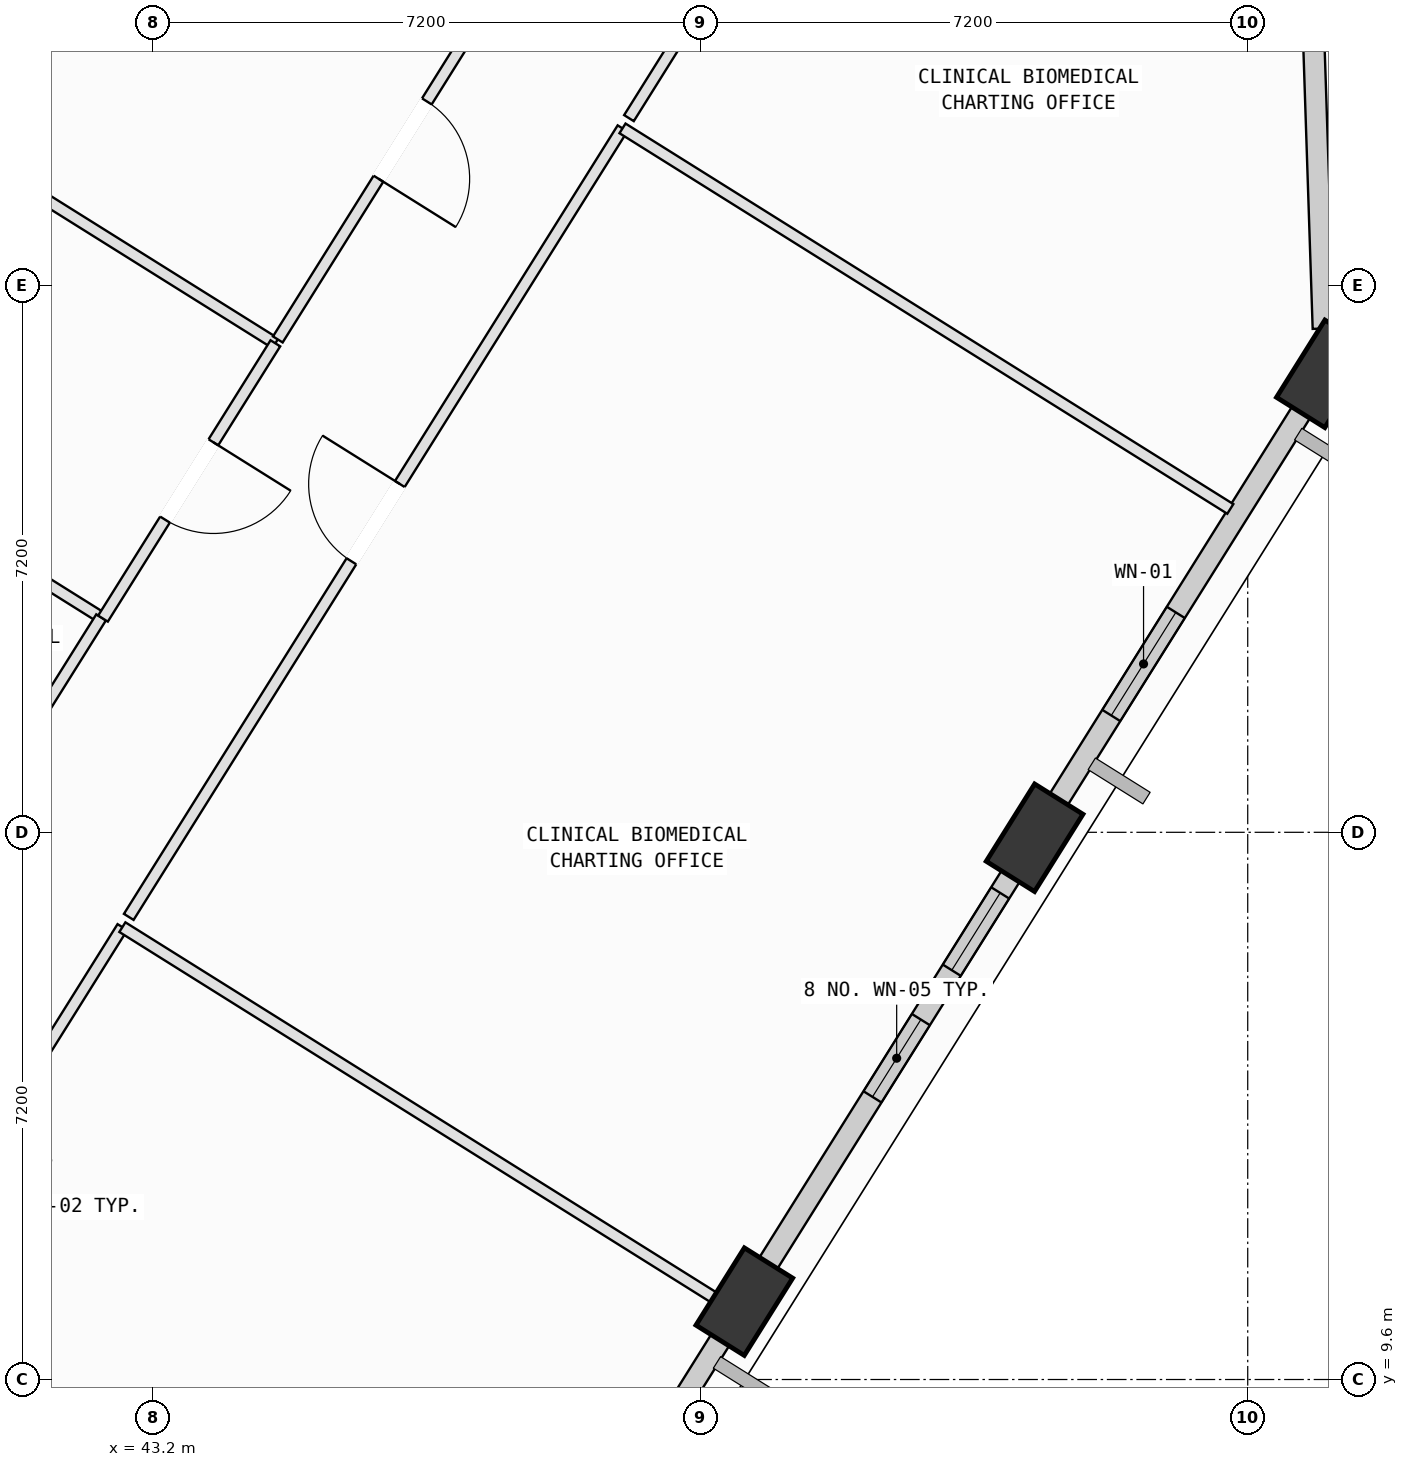
"""IFC4 building model, lengths in metres.
Left out: names, types, materials, properties, quantities, classifications, styles, units other than length and angle.
Written with IfcOpenShell. Run it as: python <this file> out.ifc"""

import sys

from ifc_helpers import new_model, si_unit, direction, frame, frame_2d, origin, origin_2d, place, context, subcontext, project, spatial, rectangle, extrude, element, fill, save


model = new_model("IFC4")
c1 = context("Model", 3, precision=1e-05, world=origin(), true_north=direction((0.0, 1.0)))
c2 = subcontext(c1, "Body", "Model", "MODEL_VIEW")
j1 = project(units=[si_unit("LENGTHUNIT", "METRE"), si_unit("PLANEANGLEUNIT", "RADIAN")], contexts=[c1])
p1 = place(None, origin())
s1 = spatial("IfcSite", under=j1, at=p1, CompositionType="ELEMENT")
p2 = place(p1, origin())
s2 = spatial("IfcBuilding", under=s1, at=p2, CompositionType="ELEMENT")
p3 = place(p2, frame((0.0, 0.0, 272.6)))
s3 = spatial("IfcBuildingStorey", under=s2, at=p3, CompositionType="ELEMENT", Elevation=272.6)
p4 = place(p3, frame((50.977, 10.625, 0.068), z_axis=(0.05795606308, 0.072182204498, 0.995706193667), x_axis=(-0.942163536267, -0.325840094684, 0.078460841345)))
e1 = element("IfcColumn", 1, at=p4, inside=s3, PredefinedType="COLUMN", context=c2, shape_type="SweptSolid", body=[
    extrude(rectangle(XDim=1.2, YDim=0.75, at=origin_2d()), origin(), (0.0, 0.0, 1.0), 3.947),
])
p5 = place(p3, frame((54.796, 16.728, 0.069), z_axis=(0.032599412049, 0.087715306046, 0.995612024545), x_axis=(-0.791394163141, -0.606138977374, 0.079314681199)))
e2 = element("IfcColumn", 2, at=p5, inside=s3, PredefinedType="COLUMN", context=c2, shape_type="SweptSolid", body=[
    extrude(rectangle(XDim=1.2, YDim=0.75, at=origin_2d()), origin(), (0.0, 0.0, 1.0), 3.947),
])
p6 = place(p3, frame((58.615, 22.833, 0.076), z_axis=(0.007305287908, 0.103202669001, 0.994633521394), x_axis=(-0.588860753256, -0.803463214161, 0.087691942418)))
e3 = element("IfcColumn", 3, at=p6, inside=s3, PredefinedType="COLUMN", context=c2, shape_type="SweptSolid", body=[
    extrude(rectangle(XDim=1.2, YDim=0.75, at=origin_2d()), origin(), (0.0, 0.0, 1.0), 3.944),
])
p7 = place(p3, frame((50.86, 10.44, 0.0), z_axis=(0.0, 0.0, 1.0), x_axis=(-0.530676257758, -0.847574604063, 0.0)))
e4 = element("IfcWall", 4, at=p7, inside=s3, PredefinedType="SOLIDWALL", context=c2, shape_type="SweptSolid", body=[
    extrude(rectangle(XDim=6.414, YDim=0.28, at=frame_2d((3.207, 0.0))), origin(), (0.0, 0.0, 1.0), 3.265),
])
p8 = place(p7, frame((2.305, 0.0, 0.75)))
e5 = element("IfcOpeningElement", 5, at=p8, cuts=e4, PredefinedType="OPENING", context=c2, shape_type="SweptSolid", body=[
    extrude(rectangle(XDim=1.8, YDim=2.05, at=frame_2d((0.9, 1.025))), frame((0.0, 0.15, 0.0), z_axis=(0.0, -1.0, 0.0), x_axis=(1.0, 0.0, 0.0)), (0.0, 0.0, 1.0), 0.3),
])
p9 = place(p3, frame((54.681, 16.543, 0.0), z_axis=(0.0, 0.0, 1.0), x_axis=(-0.530659848468, -0.847584877888, 0.0)))
e6 = element("IfcWall", 6, at=p9, inside=s3, PredefinedType="SOLIDWALL", context=c2, shape_type="SweptSolid", body=[
    extrude(rectangle(XDim=6.407, YDim=0.28, at=frame_2d((3.204, 0.0))), origin(), (0.0, 0.0, 1.0), 3.265),
])
p10 = place(p9, frame((2.604, 0.0, 0.75)))
e7 = element("IfcOpeningElement", 7, at=p10, cuts=e6, PredefinedType="OPENING", context=c2, shape_type="SweptSolid", body=[
    extrude(rectangle(XDim=1.2, YDim=1.75, at=frame_2d((0.6, 0.875))), frame((0.0, 0.15, 0.0), z_axis=(0.0, -1.0, 0.0), x_axis=(1.0, 0.0, 0.0)), (0.0, 0.0, 1.0), 0.3),
])
p11 = place(p9, frame((0.637, 0.0, 0.75)))
e8 = element("IfcOpeningElement", 8, at=p11, cuts=e6, PredefinedType="OPENING", context=c2, shape_type="SweptSolid", body=[
    extrude(rectangle(XDim=1.2, YDim=1.75, at=frame_2d((0.6, 0.875))), frame((0.0, 0.15, 0.0), z_axis=(0.0, -1.0, 0.0), x_axis=(1.0, 0.0, 0.0)), (0.0, 0.0, 1.0), 0.3),
])
p12 = place(p3, frame((58.507, 22.654, 0.0), z_axis=(0.0, 0.0, 1.0), x_axis=(-0.530658662943, -0.847585620125, 0.0)))
e9 = element("IfcWall", 9, at=p12, inside=s3, PredefinedType="SOLIDWALL", context=c2, shape_type="SweptSolid", body=[
    extrude(rectangle(XDim=6.418, YDim=0.28, at=frame_2d((3.209, 0.0))), origin(), (0.0, 0.0, 1.0), 3.265),
])
p13 = place(p12, frame((3.493, 0.0, 0.75)))
e10 = element("IfcOpeningElement", 10, at=p13, cuts=e9, PredefinedType="OPENING", context=c2, shape_type="SweptSolid", body=[
    extrude(rectangle(XDim=1.6, YDim=1.95, at=frame_2d((0.8, 0.975))), frame((0.0, 0.15, 0.0), z_axis=(0.0, -1.0, 0.0), x_axis=(1.0, 0.0, 0.0)), (0.0, 0.0, 1.0), 0.3),
])
p14 = place(p3, frame((58.419, 28.719, 0.0), z_axis=(0.0, 0.0, 1.0), x_axis=(0.033204271965, -0.999448586133, 0.0)))
e11 = element("IfcWall", 11, at=p14, inside=s3, PredefinedType="SOLIDWALL", context=c2, shape_type="SweptSolid", body=[
    extrude(rectangle(XDim=5.294, YDim=0.28, at=frame_2d((2.647, 0.0))), origin(), (0.0, 0.0, 1.0), 3.265),
])
p15 = place(p3, frame((39.48, 10.259, 0.0), z_axis=(0.0, 0.0, 1.0), x_axis=(0.530673487846, 0.84757633833, 0.0)))
e12 = element("IfcWall", 12, at=p15, inside=s3, PredefinedType="PARTITIONING", context=c2, shape_type="SweptSolid", body=[
    extrude(rectangle(XDim=6.245, YDim=0.15, at=frame_2d((3.123, 0.0))), origin(), (0.0, 0.0, 1.0), 3.78),
])
p16 = place(p15, frame((2.522, 0.0, 0.0)))
e13 = element("IfcOpeningElement", 13, at=p16, cuts=e12, PredefinedType="OPENING", context=c2, shape_type="SweptSolid", body=[
    extrude(rectangle(XDim=1.2, YDim=2.15, at=frame_2d((0.6, 1.075))), frame((0.0, 0.085, 0.0), z_axis=(0.0, -1.0, 0.0), x_axis=(1.0, 0.0, 0.0)), (0.0, 0.0, 1.0), 0.17),
])
p17 = place(p3, frame((42.794, 15.552, 0.0), z_axis=(0.0, 0.0, 1.0), x_axis=(0.84754648377, -0.530721167704, 0.0)))
e14 = element("IfcWall", 14, at=p17, inside=s3, PredefinedType="PARTITIONING", context=c2, shape_type="SweptSolid", body=[
    extrude(rectangle(XDim=9.447, YDim=0.15, at=frame_2d((4.724, 0.0))), origin(), (0.0, 0.0, 1.0), 3.78),
])
p18 = place(p3, frame((42.878, 15.687, 0.0), z_axis=(0.0, 0.0, 1.0), x_axis=(0.530687191851, 0.847567758002, 0.0)))
e15 = element("IfcWall", 15, at=p18, inside=s3, PredefinedType="PARTITIONING", context=c2, shape_type="SweptSolid", body=[
    extrude(rectangle(XDim=12.241, YDim=0.15, at=frame_2d((6.121, 0.0))), origin(), (0.0, 0.0, 1.0), 3.415),
])
p19 = place(p18, frame((5.521, 0.0, 0.0)))
e16 = element("IfcOpeningElement", 16, at=p19, cuts=e15, PredefinedType="OPENING", context=c2, shape_type="SweptSolid", body=[
    extrude(rectangle(XDim=1.2, YDim=2.15, at=frame_2d((0.6, 1.075))), frame((0.0, 0.085, 0.0), z_axis=(0.0, -1.0, 0.0), x_axis=(1.0, 0.0, 0.0)), (0.0, 0.0, 1.0), 0.17),
])
p20 = place(p3, frame((49.374, 26.062, 0.0), z_axis=(0.0, 0.0, 1.0), x_axis=(0.847573559708, -0.530677925756, 0.0)))
e17 = element("IfcWall", 17, at=p20, inside=s3, PredefinedType="PARTITIONING", context=c2, shape_type="SweptSolid", body=[
    extrude(rectangle(XDim=9.435, YDim=0.15, at=frame_2d((4.718, 0.0))), origin(), (0.0, 0.0, 1.0), 3.78),
])
p21 = place(p3, frame((55.296, 17.092, 0.0), z_axis=(0.0, 0.0, 1.0), x_axis=(-0.53041467039, -0.847738330757, 0.0)))
e18 = element("IfcWall", 18, at=p21, inside=s3, PredefinedType="PARTITIONING", context=c2, shape_type="SweptSolid", body=[
    extrude(rectangle(XDim=0.792, YDim=0.15, at=frame_2d((0.396, 0.0))), origin(), (0.0, 0.0, 1.0), 3.265),
])
p22 = place(p3, frame((51.476, 10.991, 0.0), z_axis=(0.0, 0.0, 1.0), x_axis=(-0.530036692051, -0.847974707806, 0.0)))
e19 = element("IfcWall", 19, at=p22, inside=s3, PredefinedType="PARTITIONING", context=c2, shape_type="SweptSolid", body=[
    extrude(rectangle(XDim=0.581, YDim=0.15, at=frame_2d((0.291, 0.0))), origin(), (0.0, 0.0, 1.0), 3.265),
])
p23 = place(p3, frame((60.162, 24.864, 0.0), z_axis=(0.0, 0.0, 1.0), x_axis=(-0.530700631331, -0.847559342999, 0.0)))
e20 = element("IfcWall", 20, at=p23, inside=s3, PredefinedType="PARTITIONING", context=c2, shape_type="SweptSolid", body=[
    extrude(rectangle(XDim=2.751, YDim=0.15, at=frame_2d((1.376, 0.0))), origin(), (0.0, 0.0, 1.0), 3.265),
])
p24 = place(p3, frame((49.459, 26.197, 0.0), z_axis=(0.0, 0.0, 1.0), x_axis=(0.530644342524, 0.847594585723, 0.0)))
e21 = element("IfcWall", 21, at=p24, inside=s3, PredefinedType="PARTITIONING", context=c2, shape_type="SweptSolid", body=[
    extrude(rectangle(XDim=6.935, YDim=0.15, at=frame_2d((3.467, 0.0))), origin(), (0.0, 0.0, 1.0), 3.78),
])
p25 = place(p24, frame((2.867, 0.0, 0.0)))
e22 = element("IfcOpeningElement", 22, at=p25, cuts=e21, PredefinedType="OPENING", context=c2, shape_type="SweptSolid", body=[
    extrude(rectangle(XDim=1.2, YDim=2.15, at=frame_2d((0.6, 1.075))), frame((0.0, 0.085, 0.0), z_axis=(0.0, -1.0, 0.0), x_axis=(1.0, 0.0, 0.0)), (0.0, 0.0, 1.0), 0.17),
])
p26 = place(p3, frame((34.462, 24.67, 0.0), z_axis=(0.0, 0.0, 1.0), x_axis=(0.847549004831, -0.53071714162, 0.0)))
e23 = element("IfcWall", 23, at=p26, inside=s3, PredefinedType="PARTITIONING", context=c2, shape_type="SweptSolid", body=[
    extrude(rectangle(XDim=9.5, YDim=0.15, at=frame_2d((4.75, 0.0))), origin(), (0.0, 0.0, 1.0), 3.78),
])
p27 = place(p3, frame((42.514, 19.628, 0.0), z_axis=(0.0, 0.0, 1.0), x_axis=(-0.530655141338, -0.847587824931, 0.0)))
e24 = element("IfcWall", 24, at=p27, inside=s3, PredefinedType="PARTITIONING", context=c2, shape_type="SweptSolid", body=[
    extrude(rectangle(XDim=5.717, YDim=0.15, at=frame_2d((2.859, 0.0))), origin(), (0.0, 0.0, 1.0), 3.78),
])
p28 = place(p3, frame((37.293, 27.938, 0.0), z_axis=(0.0, 0.0, 1.0), x_axis=(0.847597339737, -0.530639943531, 0.0)))
e25 = element("IfcWall", 25, at=p28, inside=s3, PredefinedType="PARTITIONING", context=c2, shape_type="SweptSolid", body=[
    extrude(rectangle(XDim=8.865, YDim=0.15, at=frame_2d((4.433, 0.0))), origin(), (0.0, 0.0, 1.0), 3.78),
])
p29 = place(p3, frame((44.807, 23.234, 0.0), z_axis=(0.0, 0.0, 1.0), x_axis=(-0.530702319906, -0.847558285693, 0.0)))
e26 = element("IfcWall", 26, at=p29, inside=s3, PredefinedType="PARTITIONING", context=c2, shape_type="SweptSolid", body=[
    extrude(rectangle(XDim=4.273, YDim=0.15, at=frame_2d((2.137, 0.0))), origin(), (0.0, 0.0, 1.0), 3.78),
])
p30 = place(p29, frame((1.537, 0.0, 0.0)))
e27 = element("IfcOpeningElement", 27, at=p30, cuts=e26, PredefinedType="OPENING", context=c2, shape_type="SweptSolid", body=[
    extrude(rectangle(XDim=1.2, YDim=2.15, at=frame_2d((0.6, 1.075))), frame((0.0, 0.085, 0.0), z_axis=(0.0, -1.0, 0.0), x_axis=(1.0, 0.0, 0.0)), (0.0, 0.0, 1.0), 0.17),
])
p31 = place(p3, frame((48.124, 28.532, 0.0), z_axis=(0.0, 0.0, 1.0), x_axis=(-0.530636886246, -0.847599253749, 0.0)))
e28 = element("IfcWall", 28, at=p31, inside=s3, PredefinedType="PARTITIONING", context=c2, shape_type="SweptSolid", body=[
    extrude(rectangle(XDim=6.19, YDim=0.15, at=frame_2d((3.095, 0.0))), origin(), (0.0, 0.0, 1.0), 3.78),
])
p32 = place(p31, frame((2.495, 0.0, 0.0)))
e29 = element("IfcOpeningElement", 29, at=p32, cuts=e28, PredefinedType="OPENING", context=c2, shape_type="SweptSolid", body=[
    extrude(rectangle(XDim=1.2, YDim=2.15, at=frame_2d((0.6, 1.075))), frame((0.0, 0.085, 0.0), z_axis=(0.0, -1.0, 0.0), x_axis=(1.0, 0.0, 0.0)), (0.0, 0.0, 1.0), 0.17),
])
p33 = place(p10, origin())
e30 = element("IfcWindow", 30, at=p33, inside=s3, PartitioningType="SINGLE_PANEL", PredefinedType="WINDOW", context=c2, shape_type="SweptSolid", body=[
    extrude(rectangle(XDim=1.2, YDim=1.75, at=frame_2d((0.6, 0.875))), frame((0.0, 0.03, 0.0), z_axis=(0.0, -1.0, 0.0), x_axis=(1.0, 0.0, 0.0)), (0.0, 0.0, 1.0), 0.06),
])
fill(e7, e30)
p34 = place(p11, origin())
e31 = element("IfcWindow", 31, at=p34, inside=s3, PartitioningType="SINGLE_PANEL", PredefinedType="WINDOW", context=c2, shape_type="SweptSolid", body=[
    extrude(rectangle(XDim=1.2, YDim=1.75, at=frame_2d((0.6, 0.875))), frame((0.0, 0.03, 0.0), z_axis=(0.0, -1.0, 0.0), x_axis=(1.0, 0.0, 0.0)), (0.0, 0.0, 1.0), 0.06),
])
fill(e8, e31)
p35 = place(p13, origin())
e32 = element("IfcWindow", 32, at=p35, inside=s3, PartitioningType="SINGLE_PANEL", PredefinedType="WINDOW", context=c2, shape_type="SweptSolid", body=[
    extrude(rectangle(XDim=1.6, YDim=1.95, at=frame_2d((0.8, 0.975))), frame((0.0, 0.03, 0.0), z_axis=(0.0, -1.0, 0.0), x_axis=(1.0, 0.0, 0.0)), (0.0, 0.0, 1.0), 0.06),
])
fill(e10, e32)
p36 = place(p19, origin())
e33 = element("IfcDoor", 33, at=p36, inside=s3, OperationType="SINGLE_SWING_RIGHT", PredefinedType="DOOR", context=c2, shape_type="SweptSolid", body=[
    extrude(rectangle(XDim=1.2, YDim=2.15, at=frame_2d((0.6, 1.075))), frame((0.0, 0.025, 0.0), z_axis=(0.0, -1.0, 0.0), x_axis=(1.0, 0.0, 0.0)), (0.0, 0.0, 1.0), 0.05),
])
fill(e16, e33)
p37 = place(p30, origin())
e34 = element("IfcDoor", 34, at=p37, inside=s3, OperationType="SINGLE_SWING_LEFT", PredefinedType="DOOR", context=c2, shape_type="SweptSolid", body=[
    extrude(rectangle(XDim=1.2, YDim=2.15, at=frame_2d((0.6, 1.075))), frame((0.0, 0.025, 0.0), z_axis=(0.0, -1.0, 0.0), x_axis=(1.0, 0.0, 0.0)), (0.0, 0.0, 1.0), 0.05),
])
fill(e27, e34)
p38 = place(p32, origin())
e35 = element("IfcDoor", 35, at=p38, inside=s3, OperationType="SINGLE_SWING_RIGHT", PredefinedType="DOOR", context=c2, shape_type="SweptSolid", body=[
    extrude(rectangle(XDim=1.2, YDim=2.15, at=frame_2d((0.6, 1.075))), frame((0.0, 0.025, 0.0), z_axis=(0.0, -1.0, 0.0), x_axis=(1.0, 0.0, 0.0)), (0.0, 0.0, 1.0), 0.05),
])
fill(e29, e35)
save(model, sys.argv[1])
